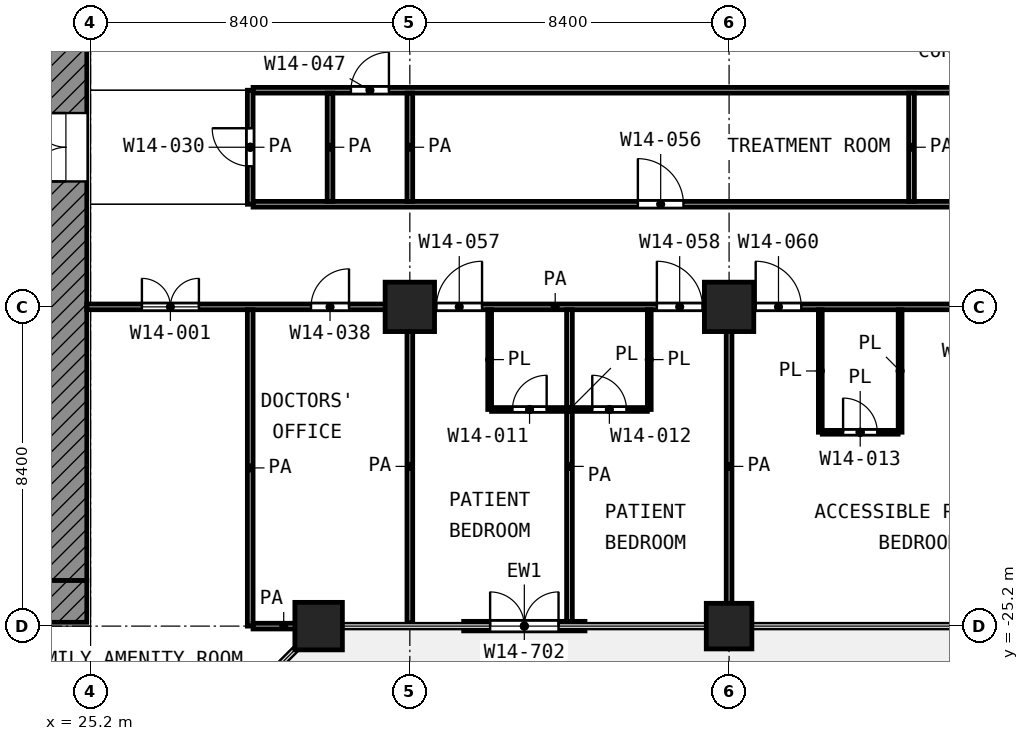
"""IFC4 building model, lengths in metres.
Left out: names, types, materials, properties, quantities, classifications, styles, units other than length and angle.
Written with IfcOpenShell. Run it as: python <this file> out.ifc"""

import sys

from ifc_helpers import new_model, si_unit, direction, frame, frame_2d, origin, origin_2d, place, context, subcontext, project, spatial, rectangle, extrude, element, fill, save


model = new_model("IFC4")
c1 = context("Model", 3, precision=1e-05, world=origin(), true_north=direction((0.0, 1.0)))
c2 = subcontext(c1, "Body", "Model", "MODEL_VIEW")
j1 = project(units=[si_unit("LENGTHUNIT", "METRE"), si_unit("PLANEANGLEUNIT", "RADIAN")], contexts=[c1])
p1 = place(None, origin())
s1 = spatial("IfcSite", under=j1, at=p1, CompositionType="ELEMENT")
p2 = place(p1, origin())
s2 = spatial("IfcBuilding", under=s1, at=p2, CompositionType="ELEMENT")
p3 = place(p2, frame((0.0, 0.0, 64.4)))
s3 = spatial("IfcBuildingStorey", under=s2, at=p3, CompositionType="ELEMENT", Elevation=64.4)
for number, where, z_axis, x_axis in (
    (1, (33.6, -16.8, 0.0), (0.0, 0.0, 1.0), (1.0, 0.0, 0.0)),
    (2, (42.0, -16.8, 0.0), (0.0, 0.0, 1.0), (1.0, 0.0, 0.0)),
):
    element("IfcColumn", number, at=place(p3, frame(where, z_axis=z_axis, x_axis=x_axis)), inside=s3, PredefinedType="COLUMN", context=c2, shape_type="SweptSolid", body=[
        extrude(rectangle(XDim=1.3, YDim=1.3, at=origin_2d()), origin(), (0.0, 0.0, 1.0), 4.2),
    ])
p4 = place(p3, frame((31.2, -25.2, 0.0), z_axis=(0.0, 0.0, 1.0), x_axis=(1.0, 0.0, 0.0)))
e3 = element("IfcColumn", 3, at=p4, inside=s3, PredefinedType="COLUMN", context=c2, shape_type="SweptSolid", body=[
    extrude(rectangle(XDim=1.25, YDim=1.25, at=origin_2d()), origin(), (0.0, 0.0, 1.0), 4.2),
])
p5 = place(p3, frame((42.0, -25.2, 0.0), z_axis=(0.0, 0.0, 1.0), x_axis=(1.0, 0.0, 0.0)))
e4 = element("IfcColumn", 4, at=p5, inside=s3, PredefinedType="COLUMN", context=c2, shape_type="SweptSolid", body=[
    extrude(rectangle(XDim=1.2, YDim=1.2, at=origin_2d()), origin(), (0.0, 0.0, 1.0), 4.2),
])
p6 = place(p3, frame((35.017, -25.2, 0.0), z_axis=(0.0, 0.0, 1.0), x_axis=(1.0, 0.0, 0.0)))
e5 = element("IfcWall", 5, at=p6, inside=s3, PredefinedType="SOLIDWALL", context=c2, shape_type="SweptSolid", body=[
    extrude(rectangle(XDim=3.192, YDim=0.25, at=frame_2d((1.596, 0.0))), origin(), (0.0, 0.0, 1.0), 3.78),
])
p7 = place(p6, frame((0.696, 0.0, 0.0)))
e6 = element("IfcOpeningElement", 6, at=p7, cuts=e5, PredefinedType="OPENING", context=c2, shape_type="SweptSolid", body=[
    extrude(rectangle(XDim=1.8, YDim=2.1, at=frame_2d((0.9, 1.05))), frame((0.0, 0.135, 0.0), z_axis=(0.0, -1.0, 0.0), x_axis=(1.0, 0.0, 0.0)), (0.0, 0.0, 1.0), 0.27),
])
p8 = place(p3, frame((24.55, -24.0, 0.0), z_axis=(0.0, 0.0, 1.0), x_axis=(0.0, 1.0, 0.0)))
e7 = element("IfcWall", 7, at=p8, inside=s3, PredefinedType="SHEAR", context=c2, shape_type="SweptSolid", body=[
    extrude(rectangle(XDim=18.6, YDim=1.1, at=frame_2d((9.3, 0.0))), origin(), (0.0, 0.0, 1.0), 3.9),
])
p9 = place(p8, frame((10.5, 0.0, 0.0)))
e8 = element("IfcOpeningElement", 8, at=p9, cuts=e7, PredefinedType="OPENING", context=c2, shape_type="SweptSolid", body=[
    extrude(rectangle(XDim=1.8, YDim=2.1, at=frame_2d((0.9, 1.05))), frame((0.0, 0.56, 0.0), z_axis=(0.0, -1.0, 0.0), x_axis=(1.0, 0.0, 0.0)), (0.0, 0.0, 1.0), 1.12),
])
p10 = place(p3, frame((24.55, -25.1, 0.0), z_axis=(0.0, 0.0, 1.0), x_axis=(0.0, 1.0, 0.0)))
e9 = element("IfcWall", 9, at=p10, inside=s3, PredefinedType="SHEAR", context=c2, shape_type="SweptSolid", body=[
    extrude(rectangle(XDim=1.1, YDim=1.1, at=frame_2d((0.55, 0.0))), origin(), (0.0, 0.0, 1.0), 3.9),
])
p11 = place(p3, frame((44.452, -20.1, 0.0), z_axis=(0.0, 0.0, 1.0), x_axis=(1.0, 0.0, 0.0)))
e10 = element("IfcWall", 10, at=p11, inside=s3, PredefinedType="PARTITIONING", context=c2, shape_type="SweptSolid", body=[
    extrude(rectangle(XDim=1.996, YDim=0.1, at=frame_2d((0.998, 0.0))), origin(), (0.0, 0.0, 1.0), 3.9),
])
p12 = place(p11, frame((0.548, 0.0, 0.0)))
e11 = element("IfcOpeningElement", 11, at=p12, cuts=e10, PredefinedType="OPENING", context=c2, shape_type="SweptSolid", body=[
    extrude(rectangle(XDim=0.9, YDim=2.1, at=frame_2d((0.45, 1.05))), frame((0.0, 0.06, 0.0), z_axis=(0.0, -1.0, 0.0), x_axis=(1.0, 0.0, 0.0)), (0.0, 0.0, 1.0), 0.12),
])
p13 = place(p3, frame((35.75, -19.5, 0.0), z_axis=(0.0, 0.0, 1.0), x_axis=(1.0, 0.0, 0.0)))
e12 = element("IfcWall", 12, at=p13, inside=s3, PredefinedType="PARTITIONING", context=c2, shape_type="SweptSolid", body=[
    extrude(rectangle(XDim=4.1, YDim=0.1, at=frame_2d((2.05, 0.0))), origin(), (0.0, 0.0, 1.0), 3.9),
])
p14 = place(p13, frame((0.55, 0.0, 0.0)))
e13 = element("IfcOpeningElement", 13, at=p14, cuts=e12, PredefinedType="OPENING", context=c2, shape_type="SweptSolid", body=[
    extrude(rectangle(XDim=0.9, YDim=2.1, at=frame_2d((0.45, 1.05))), frame((0.0, 0.06, 0.0), z_axis=(0.0, -1.0, 0.0), x_axis=(1.0, 0.0, 0.0)), (0.0, 0.0, 1.0), 0.12),
])
p15 = place(p13, frame((2.65, 0.0, 0.0)))
e14 = element("IfcOpeningElement", 14, at=p15, cuts=e12, PredefinedType="OPENING", context=c2, shape_type="SweptSolid", body=[
    extrude(rectangle(XDim=0.9, YDim=2.1, at=frame_2d((0.45, 1.05))), frame((0.0, 0.06, 0.0), z_axis=(0.0, -1.0, 0.0), x_axis=(1.0, 0.0, 0.0)), (0.0, 0.0, 1.0), 0.12),
])
for number, where, z_axis, x_axis in (
    (15, (35.7, -19.5, 0.0), (0.0, 0.0, 1.0), (0.0, 1.0, 0.0)),
    (16, (39.9, -19.5, 0.0), (0.0, 0.0, 1.0), (0.0, 1.0, 0.0)),
):
    element("IfcWall", number, at=place(p3, frame(where, z_axis=z_axis, x_axis=x_axis)), inside=s3, PredefinedType="PARTITIONING", context=c2, shape_type="SweptSolid", body=[
        extrude(rectangle(XDim=2.625, YDim=0.1, at=frame_2d((1.312, 0.0))), origin(), (0.0, 0.0, 1.0), 3.9),
    ])
p16 = place(p3, frame((44.4, -20.099, 0.0), z_axis=(0.0, 0.0, 1.0), x_axis=(0.0, 1.0, 0.0)))
e17 = element("IfcWall", 17, at=p16, inside=s3, PredefinedType="PARTITIONING", context=c2, shape_type="SweptSolid", body=[
    extrude(rectangle(XDim=3.224, YDim=0.1, at=frame_2d((1.612, 0.0))), origin(), (0.0, 0.0, 1.0), 3.9),
])
p17 = place(p3, frame((46.5, -20.098, 0.0), z_axis=(0.0, 0.0, 1.0), x_axis=(0.0, 1.0, 0.0)))
e18 = element("IfcWall", 18, at=p17, inside=s3, PredefinedType="PARTITIONING", context=c2, shape_type="SweptSolid", body=[
    extrude(rectangle(XDim=3.223, YDim=0.1, at=frame_2d((1.611, 0.0))), origin(), (0.0, 0.0, 1.0), 3.9),
])
p18 = place(p3, frame((29.475, -25.2, 0.0), z_axis=(0.0, 0.0, 1.0), x_axis=(1.0, 0.0, 0.0)))
e19 = element("IfcWall", 19, at=p18, inside=s3, PredefinedType="PARTITIONING", context=c2, shape_type="SweptSolid", body=[
    extrude(rectangle(XDim=1.612, YDim=0.15, at=frame_2d((0.806, 0.0))), origin(), (0.0, 0.0, 1.0), 3.9),
])
p19 = place(p3, frame((25.1, -16.8, 0.0), z_axis=(0.0, 0.0, 1.0), x_axis=(1.0, 0.0, 0.0)))
e20 = element("IfcWall", 20, at=p19, inside=s3, PredefinedType="PARTITIONING", context=c2, shape_type="SweptSolid", body=[
    extrude(rectangle(XDim=24.65, YDim=0.15, at=frame_2d((12.325, 0.0))), origin(), (0.0, 0.0, 1.0), 3.9),
])
p20 = place(p19, frame((1.45, 0.0, 0.0)))
e21 = element("IfcOpeningElement", 21, at=p20, cuts=e20, PredefinedType="OPENING", context=c2, shape_type="SweptSolid", body=[
    extrude(rectangle(XDim=1.5, YDim=2.1, at=frame_2d((0.75, 1.05))), frame((0.0, 0.085, 0.0), z_axis=(0.0, -1.0, 0.0), x_axis=(1.0, 0.0, 0.0)), (0.0, 0.0, 1.0), 0.17),
])
p21 = place(p19, frame((5.9, 0.0, 0.0)))
e22 = element("IfcOpeningElement", 22, at=p21, cuts=e20, PredefinedType="OPENING", context=c2, shape_type="SweptSolid", body=[
    extrude(rectangle(XDim=1.0, YDim=2.1, at=frame_2d((0.5, 1.05))), frame((0.0, 0.085, 0.0), z_axis=(0.0, -1.0, 0.0), x_axis=(1.0, 0.0, 0.0)), (0.0, 0.0, 1.0), 0.17),
])
p22 = place(p19, frame((9.2, 0.0, 0.0)))
e23 = element("IfcOpeningElement", 23, at=p22, cuts=e20, PredefinedType="OPENING", context=c2, shape_type="SweptSolid", body=[
    extrude(rectangle(XDim=1.2, YDim=2.1, at=frame_2d((0.6, 1.05))), frame((0.0, 0.085, 0.0), z_axis=(0.0, -1.0, 0.0), x_axis=(1.0, 0.0, 0.0)), (0.0, 0.0, 1.0), 0.17),
])
p23 = place(p19, frame((15.0, 0.0, 0.0)))
e24 = element("IfcOpeningElement", 24, at=p23, cuts=e20, PredefinedType="OPENING", context=c2, shape_type="SweptSolid", body=[
    extrude(rectangle(XDim=1.2, YDim=2.1, at=frame_2d((0.6, 1.05))), frame((0.0, 0.085, 0.0), z_axis=(0.0, -1.0, 0.0), x_axis=(1.0, 0.0, 0.0)), (0.0, 0.0, 1.0), 0.17),
])
p24 = place(p19, frame((22.967, 0.0, 0.0)))
e25 = element("IfcOpeningElement", 25, at=p24, cuts=e20, PredefinedType="OPENING", context=c2, shape_type="SweptSolid", body=[
    extrude(rectangle(XDim=1.2, YDim=2.1, at=frame_2d((0.6, 1.05))), frame((0.0, 0.085, 0.0), z_axis=(0.0, -1.0, 0.0), x_axis=(1.0, 0.0, 0.0)), (0.0, 0.0, 1.0), 0.17),
])
p25 = place(p19, frame((17.6, 0.0, 0.0)))
e26 = element("IfcOpeningElement", 26, at=p25, cuts=e20, PredefinedType="OPENING", context=c2, shape_type="SweptSolid", body=[
    extrude(rectangle(XDim=1.2, YDim=2.1, at=frame_2d((0.6, 1.05))), frame((0.0, 0.085, 0.0), z_axis=(0.0, -1.0, 0.0), x_axis=(1.0, 0.0, 0.0)), (0.0, 0.0, 1.0), 0.17),
])
p26 = place(p3, frame((29.475, -14.1, 0.0), z_axis=(0.0, 0.0, 1.0), x_axis=(1.0, 0.0, 0.0)))
e27 = element("IfcWall", 27, at=p26, inside=s3, PredefinedType="PARTITIONING", context=c2, shape_type="SweptSolid", body=[
    extrude(rectangle(XDim=47.55, YDim=0.15, at=frame_2d((23.775, 0.0))), origin(), (0.0, 0.0, 1.0), 3.9),
])
p27 = place(p26, frame((10.125, 0.0, 0.0)))
e28 = element("IfcOpeningElement", 28, at=p27, cuts=e27, PredefinedType="OPENING", context=c2, shape_type="SweptSolid", body=[
    extrude(rectangle(XDim=1.2, YDim=2.1, at=frame_2d((0.6, 1.05))), frame((0.0, 0.085, 0.0), z_axis=(0.0, -1.0, 0.0), x_axis=(1.0, 0.0, 0.0)), (0.0, 0.0, 1.0), 0.17),
])
p28 = place(p26, frame((20.575, 0.0, 0.0)))
e29 = element("IfcOpeningElement", 29, at=p28, cuts=e27, PredefinedType="OPENING", context=c2, shape_type="SweptSolid", body=[
    extrude(rectangle(XDim=1.0, YDim=2.1, at=frame_2d((0.5, 1.05))), frame((0.0, 0.085, 0.0), z_axis=(0.0, -1.0, 0.0), x_axis=(1.0, 0.0, 0.0)), (0.0, 0.0, 1.0), 0.17),
])
p29 = place(p26, frame((31.075, 0.0, 0.0)))
e30 = element("IfcOpeningElement", 30, at=p29, cuts=e27, PredefinedType="OPENING", context=c2, shape_type="SweptSolid", body=[
    extrude(rectangle(XDim=1.0, YDim=2.1, at=frame_2d((0.5, 1.05))), frame((0.0, 0.085, 0.0), z_axis=(0.0, -1.0, 0.0), x_axis=(1.0, 0.0, 0.0)), (0.0, 0.0, 1.0), 0.17),
])
p30 = place(p26, frame((42.175, 0.0, 0.0)))
e31 = element("IfcOpeningElement", 31, at=p30, cuts=e27, PredefinedType="OPENING", context=c2, shape_type="SweptSolid", body=[
    extrude(rectangle(XDim=1.0, YDim=2.1, at=frame_2d((0.5, 1.05))), frame((0.0, 0.085, 0.0), z_axis=(0.0, -1.0, 0.0), x_axis=(1.0, 0.0, 0.0)), (0.0, 0.0, 1.0), 0.17),
])
p31 = place(p3, frame((29.475, -11.1, 0.0), z_axis=(0.0, 0.0, 1.0), x_axis=(1.0, 0.0, 0.0)))
e32 = element("IfcWall", 32, at=p31, inside=s3, PredefinedType="PARTITIONING", context=c2, shape_type="SweptSolid", body=[
    extrude(rectangle(XDim=47.55, YDim=0.15, at=frame_2d((23.775, 0.0))), origin(), (0.0, 0.0, 1.0), 3.9),
])
p32 = place(p31, frame((26.575, 0.0, 0.0)))
e33 = element("IfcOpeningElement", 33, at=p32, cuts=e32, PredefinedType="OPENING", context=c2, shape_type="SweptSolid", body=[
    extrude(rectangle(XDim=1.0, YDim=2.1, at=frame_2d((0.5, 1.05))), frame((0.0, 0.085, 0.0), z_axis=(0.0, -1.0, 0.0), x_axis=(1.0, 0.0, 0.0)), (0.0, 0.0, 1.0), 0.17),
])
p33 = place(p31, frame((35.275, 0.0, 0.0)))
e34 = element("IfcOpeningElement", 34, at=p33, cuts=e32, PredefinedType="OPENING", context=c2, shape_type="SweptSolid", body=[
    extrude(rectangle(XDim=1.0, YDim=2.1, at=frame_2d((0.5, 1.05))), frame((0.0, 0.085, 0.0), z_axis=(0.0, -1.0, 0.0), x_axis=(1.0, 0.0, 0.0)), (0.0, 0.0, 1.0), 0.17),
])
p34 = place(p31, frame((2.575, 0.0, 0.0)))
e35 = element("IfcOpeningElement", 35, at=p34, cuts=e32, PredefinedType="OPENING", context=c2, shape_type="SweptSolid", body=[
    extrude(rectangle(XDim=1.0, YDim=2.1, at=frame_2d((0.5, 1.05))), frame((0.0, 0.085, 0.0), z_axis=(0.0, -1.0, 0.0), x_axis=(1.0, 0.0, 0.0)), (0.0, 0.0, 1.0), 0.17),
])
p35 = place(p3, frame((29.4, -25.2, 0.0), z_axis=(0.0, 0.0, 1.0), x_axis=(0.0, 1.0, 0.0)))
e36 = element("IfcWall", 36, at=p35, inside=s3, PredefinedType="PARTITIONING", context=c2, shape_type="SweptSolid", body=[
    extrude(rectangle(XDim=8.325, YDim=0.15, at=frame_2d((4.163, 0.0))), origin(), (0.0, 0.0, 1.0), 3.9),
])
p36 = place(p3, frame((29.4, -14.1, 0.0), z_axis=(0.0, 0.0, 1.0), x_axis=(0.0, 1.0, 0.0)))
e37 = element("IfcWall", 37, at=p36, inside=s3, PredefinedType="PARTITIONING", context=c2, shape_type="SweptSolid", body=[
    extrude(rectangle(XDim=3.0, YDim=0.15, at=frame_2d((1.5, 0.0))), origin(), (0.0, 0.0, 1.0), 3.9),
])
p37 = place(p36, frame((1.0, 0.0, 0.0)))
e38 = element("IfcOpeningElement", 38, at=p37, cuts=e37, PredefinedType="OPENING", context=c2, shape_type="SweptSolid", body=[
    extrude(rectangle(XDim=1.0, YDim=2.1, at=frame_2d((0.5, 1.05))), frame((0.0, 0.085, 0.0), z_axis=(0.0, -1.0, 0.0), x_axis=(1.0, 0.0, 0.0)), (0.0, 0.0, 1.0), 0.17),
])
p38 = place(p3, frame((31.5, -14.025, 0.0), z_axis=(0.0, 0.0, 1.0), x_axis=(0.0, 1.0, 0.0)))
e39 = element("IfcWall", 39, at=p38, inside=s3, PredefinedType="PARTITIONING", context=c2, shape_type="SweptSolid", body=[
    extrude(rectangle(XDim=2.85, YDim=0.15, at=frame_2d((1.425, 0.0))), origin(), (0.0, 0.0, 1.0), 3.9),
])
p39 = place(p3, frame((33.6, -25.12, 0.0), z_axis=(0.0, 0.0, 1.0), x_axis=(0.0, 1.0, 0.0)))
e40 = element("IfcWall", 40, at=p39, inside=s3, PredefinedType="PARTITIONING", context=c2, shape_type="SweptSolid", body=[
    extrude(rectangle(XDim=8.245, YDim=0.15, at=frame_2d((4.123, 0.0))), origin(), (0.0, 0.0, 1.0), 3.9),
])
p40 = place(p3, frame((33.6, -14.025, 0.0), z_axis=(0.0, 0.0, 1.0), x_axis=(0.0, 1.0, 0.0)))
e41 = element("IfcWall", 41, at=p40, inside=s3, PredefinedType="PARTITIONING", context=c2, shape_type="SweptSolid", body=[
    extrude(rectangle(XDim=2.85, YDim=0.15, at=frame_2d((1.425, 0.0))), origin(), (0.0, 0.0, 1.0), 3.9),
])
for number, where, z_axis, x_axis in (
    (42, (37.8, -25.12, 0.0), (0.0, 0.0, 1.0), (0.0, 1.0, 0.0)),
    (43, (42.0, -25.12, 0.0), (0.0, 0.0, 1.0), (0.0, 1.0, 0.0)),
):
    element("IfcWall", number, at=place(p3, frame(where, z_axis=z_axis, x_axis=x_axis)), inside=s3, PredefinedType="PARTITIONING", context=c2, shape_type="SweptSolid", body=[
        extrude(rectangle(XDim=8.245, YDim=0.15, at=frame_2d((4.123, 0.0))), origin(), (0.0, 0.0, 1.0), 3.9),
    ])
p41 = place(p3, frame((46.8, -14.025, 0.0), z_axis=(0.0, 0.0, 1.0), x_axis=(0.0, 1.0, 0.0)))
e44 = element("IfcWall", 44, at=p41, inside=s3, PredefinedType="PARTITIONING", context=c2, shape_type="SweptSolid", body=[
    extrude(rectangle(XDim=2.85, YDim=0.15, at=frame_2d((1.425, 0.0))), origin(), (0.0, 0.0, 1.0), 3.9),
])
p42 = place(p7, origin())
e45 = element("IfcDoor", 45, at=p42, inside=s3, OperationType="DOUBLE_DOOR_SINGLE_SWING", PredefinedType="DOOR", context=c2, shape_type="SweptSolid", body=[
    extrude(rectangle(XDim=1.8, YDim=2.1, at=frame_2d((0.9, 1.05))), frame((0.0, 0.025, 0.0), z_axis=(0.0, -1.0, 0.0), x_axis=(1.0, 0.0, 0.0)), (0.0, 0.0, 1.0), 0.05),
])
fill(e6, e45)
p43 = place(p9, origin())
e46 = element("IfcDoor", 46, at=p43, inside=s3, OperationType="DOUBLE_DOOR_SINGLE_SWING", PredefinedType="DOOR", context=c2, shape_type="SweptSolid", body=[
    extrude(rectangle(XDim=1.8, YDim=2.1, at=frame_2d((0.9, 1.05))), frame((0.0, 0.025, 0.0), z_axis=(0.0, -1.0, 0.0), x_axis=(1.0, 0.0, 0.0)), (0.0, 0.0, 1.0), 0.05),
])
fill(e8, e46)
p44 = place(p20, origin())
e47 = element("IfcDoor", 47, at=p44, inside=s3, OperationType="DOUBLE_DOOR_SINGLE_SWING", PredefinedType="DOOR", context=c2, shape_type="SweptSolid", body=[
    extrude(rectangle(XDim=1.5, YDim=2.1, at=frame_2d((0.75, 1.05))), frame((0.0, 0.025, 0.0), z_axis=(0.0, -1.0, 0.0), x_axis=(1.0, 0.0, 0.0)), (0.0, 0.0, 1.0), 0.05),
])
fill(e21, e47)
p45 = place(p27, origin())
e48 = element("IfcDoor", 48, at=p45, inside=s3, OperationType="SINGLE_SWING_LEFT", PredefinedType="DOOR", context=c2, shape_type="SweptSolid", body=[
    extrude(rectangle(XDim=1.2, YDim=2.1, at=frame_2d((0.6, 1.05))), frame((0.0, 0.025, 0.0), z_axis=(0.0, -1.0, 0.0), x_axis=(1.0, 0.0, 0.0)), (0.0, 0.0, 1.0), 0.05),
])
fill(e28, e48)
p46 = place(p21, origin())
e49 = element("IfcDoor", 49, at=p46, inside=s3, OperationType="SINGLE_SWING_RIGHT", PredefinedType="DOOR", context=c2, shape_type="SweptSolid", body=[
    extrude(rectangle(XDim=1.0, YDim=2.1, at=frame_2d((0.5, 1.05))), frame((0.0, 0.025, 0.0), z_axis=(0.0, -1.0, 0.0), x_axis=(1.0, 0.0, 0.0)), (0.0, 0.0, 1.0), 0.05),
])
fill(e22, e49)
p47 = place(p22, origin())
e50 = element("IfcDoor", 50, at=p47, inside=s3, OperationType="SINGLE_SWING_RIGHT", PredefinedType="DOOR", context=c2, shape_type="SweptSolid", body=[
    extrude(rectangle(XDim=1.2, YDim=2.1, at=frame_2d((0.6, 1.05))), frame((0.0, 0.025, 0.0), z_axis=(0.0, -1.0, 0.0), x_axis=(1.0, 0.0, 0.0)), (0.0, 0.0, 1.0), 0.05),
])
fill(e23, e50)
p48 = place(p14, origin())
e51 = element("IfcDoor", 51, at=p48, inside=s3, OperationType="SINGLE_SWING_RIGHT", PredefinedType="DOOR", context=c2, shape_type="SweptSolid", body=[
    extrude(rectangle(XDim=0.9, YDim=2.1, at=frame_2d((0.45, 1.05))), frame((0.0, 0.025, 0.0), z_axis=(0.0, -1.0, 0.0), x_axis=(1.0, 0.0, 0.0)), (0.0, 0.0, 1.0), 0.05),
])
fill(e13, e51)
p49 = place(p23, origin())
e52 = element("IfcDoor", 52, at=p49, inside=s3, OperationType="SINGLE_SWING_LEFT", PredefinedType="DOOR", context=c2, shape_type="SweptSolid", body=[
    extrude(rectangle(XDim=1.2, YDim=2.1, at=frame_2d((0.6, 1.05))), frame((0.0, 0.025, 0.0), z_axis=(0.0, -1.0, 0.0), x_axis=(1.0, 0.0, 0.0)), (0.0, 0.0, 1.0), 0.05),
])
fill(e24, e52)
p50 = place(p15, origin())
e53 = element("IfcDoor", 53, at=p50, inside=s3, OperationType="SINGLE_SWING_LEFT", PredefinedType="DOOR", context=c2, shape_type="SweptSolid", body=[
    extrude(rectangle(XDim=0.9, YDim=2.1, at=frame_2d((0.45, 1.05))), frame((0.0, 0.025, 0.0), z_axis=(0.0, -1.0, 0.0), x_axis=(1.0, 0.0, 0.0)), (0.0, 0.0, 1.0), 0.05),
])
fill(e14, e53)
p51 = place(p25, origin())
e54 = element("IfcDoor", 54, at=p51, inside=s3, OperationType="SINGLE_SWING_LEFT", PredefinedType="DOOR", context=c2, shape_type="SweptSolid", body=[
    extrude(rectangle(XDim=1.2, YDim=2.1, at=frame_2d((0.6, 1.05))), frame((0.0, 0.025, 0.0), z_axis=(0.0, -1.0, 0.0), x_axis=(1.0, 0.0, 0.0)), (0.0, 0.0, 1.0), 0.05),
])
fill(e26, e54)
p52 = place(p12, origin())
e55 = element("IfcDoor", 55, at=p52, inside=s3, OperationType="SINGLE_SWING_LEFT", PredefinedType="DOOR", context=c2, shape_type="SweptSolid", body=[
    extrude(rectangle(XDim=0.9, YDim=2.1, at=frame_2d((0.45, 1.05))), frame((0.0, 0.025, 0.0), z_axis=(0.0, -1.0, 0.0), x_axis=(1.0, 0.0, 0.0)), (0.0, 0.0, 1.0), 0.05),
])
fill(e11, e55)
p53 = place(p37, origin())
e56 = element("IfcDoor", 56, at=p53, inside=s3, OperationType="SINGLE_SWING_RIGHT", PredefinedType="DOOR", context=c2, shape_type="SweptSolid", body=[
    extrude(rectangle(XDim=1.0, YDim=2.1, at=frame_2d((0.5, 1.05))), frame((0.0, 0.025, 0.0), z_axis=(0.0, -1.0, 0.0), x_axis=(1.0, 0.0, 0.0)), (0.0, 0.0, 1.0), 0.05),
])
fill(e38, e56)
p54 = place(p34, origin())
e57 = element("IfcDoor", 57, at=p54, inside=s3, OperationType="SINGLE_SWING_RIGHT", PredefinedType="DOOR", context=c2, shape_type="SweptSolid", body=[
    extrude(rectangle(XDim=1.0, YDim=2.1, at=frame_2d((0.5, 1.05))), frame((0.0, 0.025, 0.0), z_axis=(0.0, -1.0, 0.0), x_axis=(1.0, 0.0, 0.0)), (0.0, 0.0, 1.0), 0.05),
])
fill(e35, e57)
save(model, sys.argv[1])
